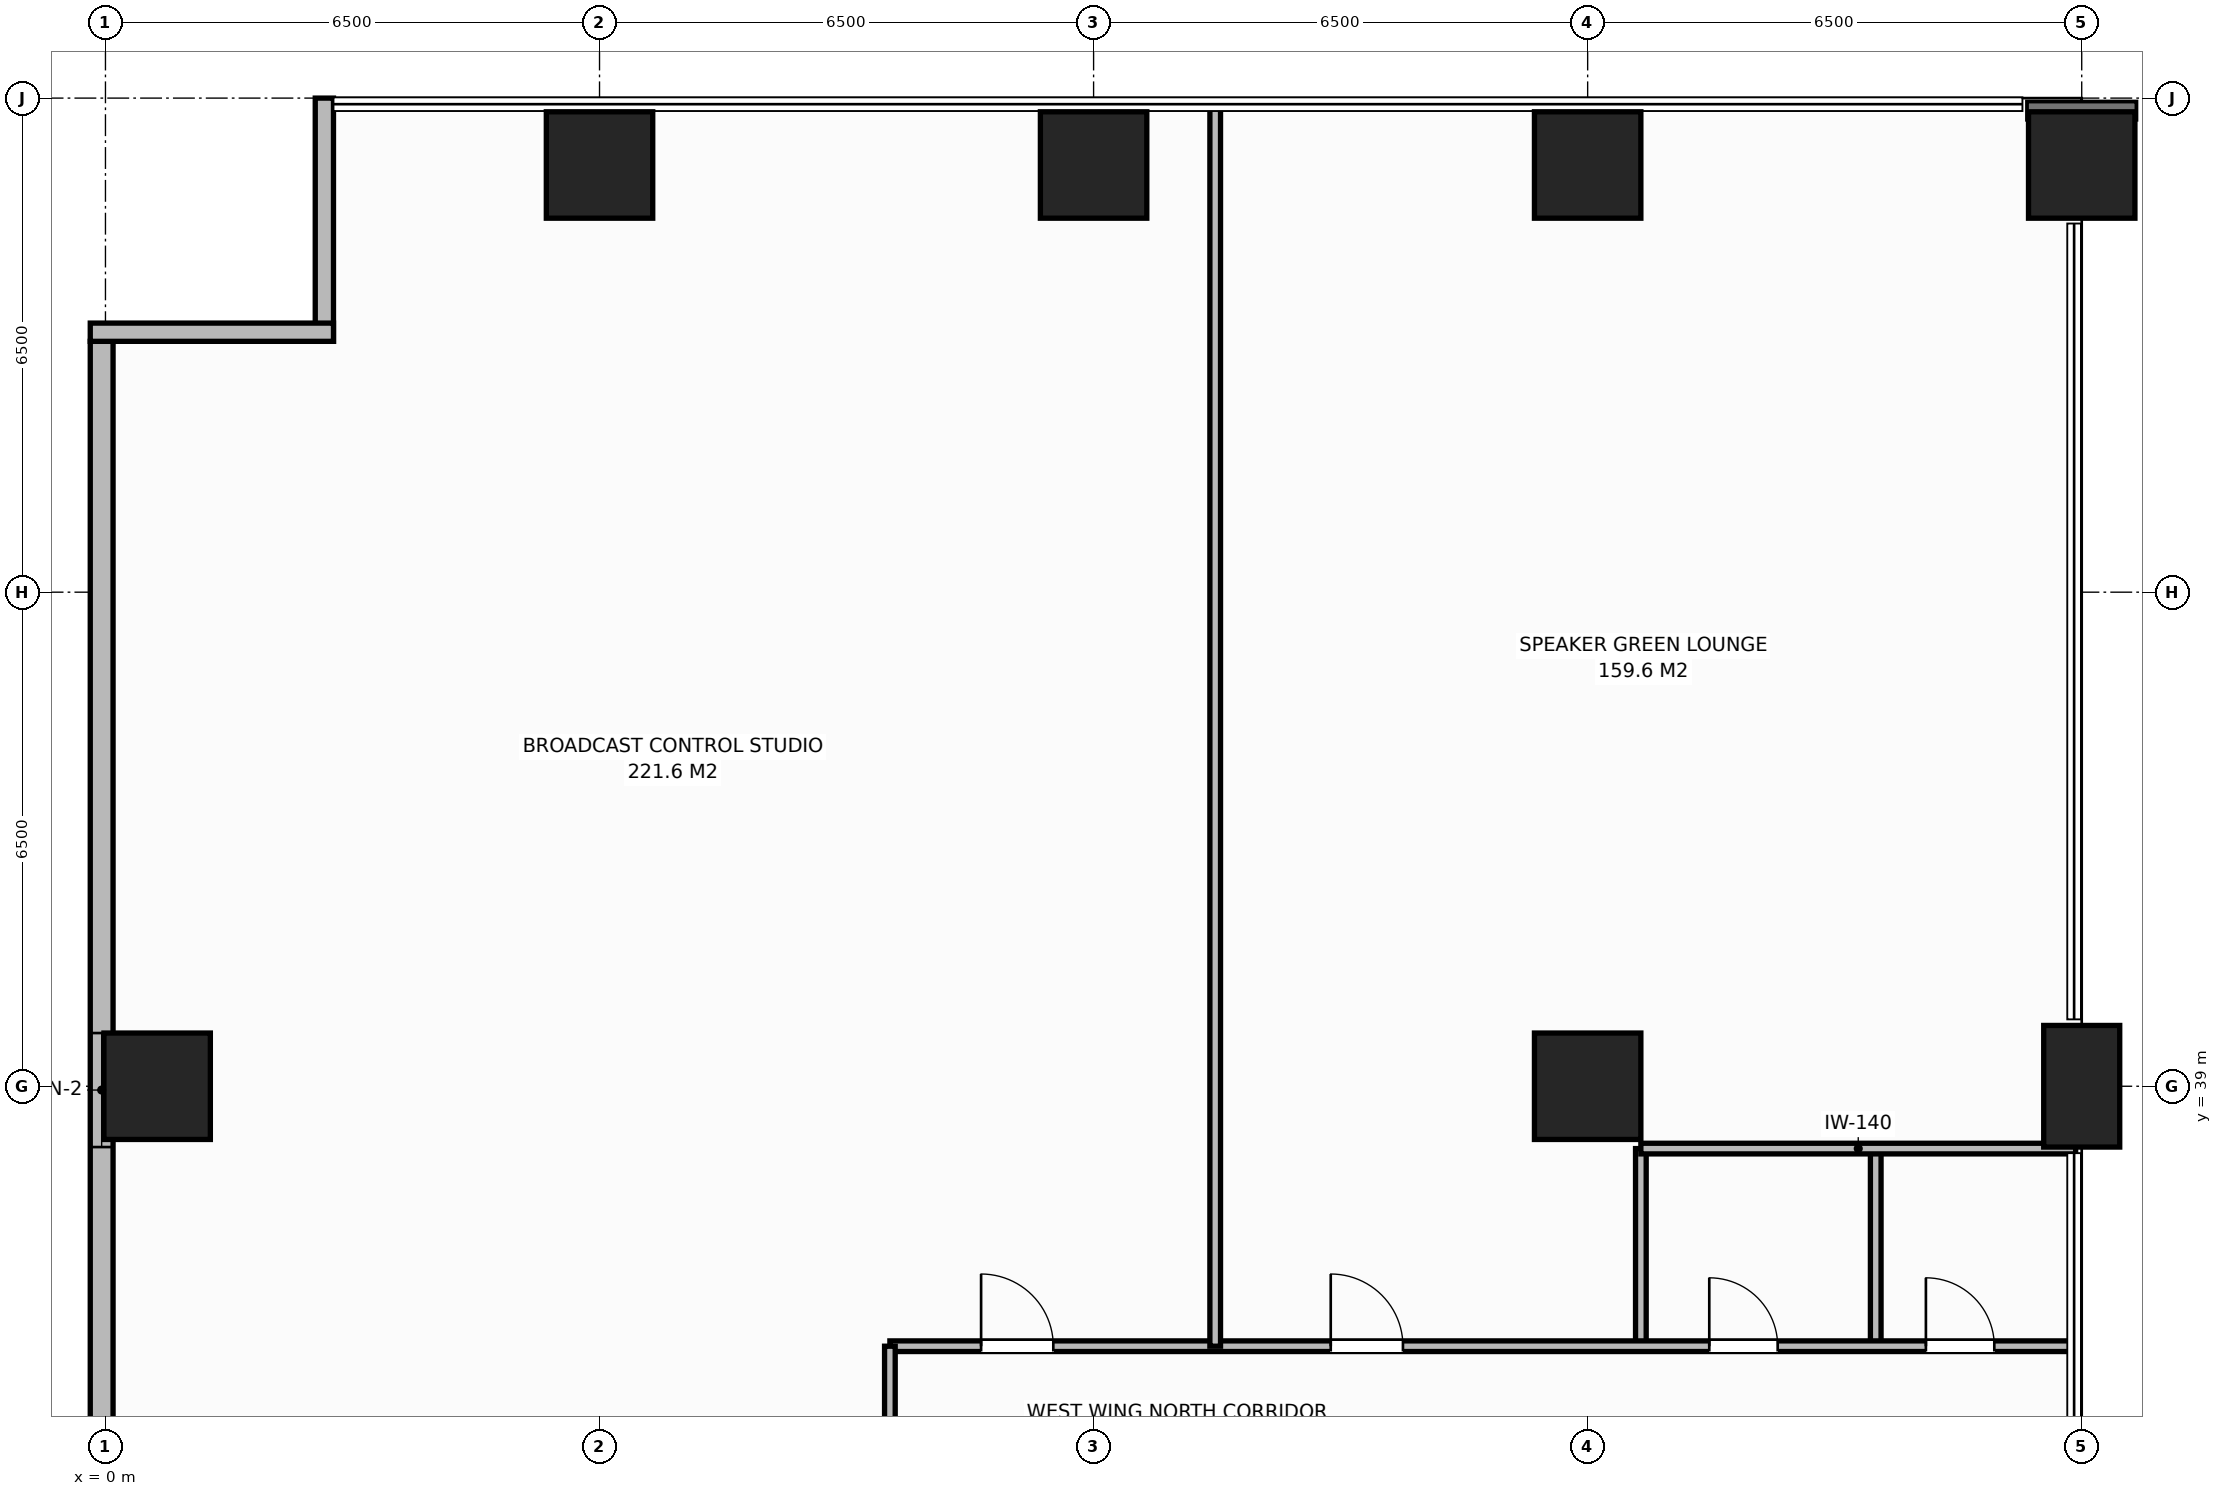
"""IFC4 building model, lengths in metres.
Left out: names, types, materials, properties, quantities, classifications, styles, units other than length and angle.
Written with IfcOpenShell. Run it as: python <this file> out.ifc"""

import sys

from ifc_helpers import new_model, si_unit, direction, frame, frame_2d, origin, origin_2d, place, context, subcontext, project, spatial, rectangle, extrude, element, fill, save


model = new_model("IFC4")
c1 = context("Model", 3, precision=1e-05, world=origin(), true_north=direction((0.0, 1.0)))
c2 = subcontext(c1, "Body", "Model", "MODEL_VIEW")
j1 = project(units=[si_unit("LENGTHUNIT", "METRE"), si_unit("PLANEANGLEUNIT", "RADIAN")], contexts=[c1])
p1 = place(None, origin())
s1 = spatial("IfcSite", under=j1, at=p1, CompositionType="ELEMENT")
p2 = place(p1, origin())
s2 = spatial("IfcBuilding", under=s1, at=p2, CompositionType="ELEMENT")
p3 = place(p2, frame((0.0, 0.0, 11.5)))
s3 = spatial("IfcBuildingStorey", under=s2, at=p3, CompositionType="ELEMENT", Elevation=11.5)
p4 = place(p3, frame((19.5, 39.0, 0.0), z_axis=(0.0, 0.0, 1.0), x_axis=(1.0, 0.0, 0.0)))
e1 = element("IfcColumn", 1, at=p4, inside=s3, PredefinedType="COLUMN", context=c2, shape_type="SweptSolid", body=[
    extrude(rectangle(XDim=1.4, YDim=1.4, at=origin_2d()), origin(), (0.0, 0.0, 1.0), 5.5),
])
p5 = place(p3, frame((26.0, 39.0, 0.0), z_axis=(0.0, 0.0, 1.0), x_axis=(1.0, 0.0, 0.0)))
e2 = element("IfcColumn", 2, at=p5, inside=s3, PredefinedType="PILASTER", context=c2, shape_type="SweptSolid", body=[
    extrude(rectangle(XDim=1.0, YDim=1.6, at=origin_2d()), origin(), (0.0, 0.0, 1.0), 5.5),
])
for number, where, z_axis, x_axis in (
    (3, (6.5, 51.12, 0.0), (0.0, 0.0, 1.0), (1.0, 0.0, 0.0)),
    (4, (13.0, 51.12, 0.0), (0.0, 0.0, 1.0), (1.0, 0.0, 0.0)),
    (5, (19.5, 51.12, 0.0), (0.0, 0.0, 1.0), (1.0, 0.0, 0.0)),
    (6, (26.0, 51.12, 0.0), (0.0, 0.0, 1.0), (1.0, 0.0, 0.0)),
    (7, (0.68, 39.0, 0.0), (0.0, 0.0, 1.0), (1.0, 0.0, 0.0)),
):
    element("IfcColumn", number, at=place(p3, frame(where, z_axis=z_axis, x_axis=x_axis)), inside=s3, PredefinedType="COLUMN", context=c2, shape_type="SweptSolid", body=[
        extrude(rectangle(XDim=1.4, YDim=1.4, at=origin_2d()), origin(), (0.0, 0.0, 1.0), 5.5),
    ])
p6 = place(p3, frame((-0.05, 3.2, 0.0), z_axis=(0.0, 0.0, 1.0), x_axis=(0.0, 1.0, 0.0)))
e8 = element("IfcWall", 8, at=p6, inside=s3, PredefinedType="STANDARD", context=c2, shape_type="SweptSolid", body=[
    extrude(rectangle(XDim=45.6, YDim=0.3, at=frame_2d((22.8, 0.0))), origin(), (0.0, 0.0, 1.0), 5.22),
])
p7 = place(p6, frame((5.0, 0.0, 0.9)))
e9 = element("IfcOpeningElement", 9, at=p7, cuts=e8, PredefinedType="OPENING", context=c2, shape_type="SweptSolid", body=[
    extrude(rectangle(XDim=1.5, YDim=2.2, at=frame_2d((0.75, 1.1))), frame((0.0, 0.16, 0.0), z_axis=(0.0, -1.0, 0.0), x_axis=(1.0, 0.0, 0.0)), (0.0, 0.0, 1.0), 0.32),
])
p8 = place(p6, frame((14.5, 0.0, 0.9)))
e10 = element("IfcOpeningElement", 10, at=p8, cuts=e8, PredefinedType="OPENING", context=c2, shape_type="SweptSolid", body=[
    extrude(rectangle(XDim=1.5, YDim=2.2, at=frame_2d((0.75, 1.1))), frame((0.0, 0.16, 0.0), z_axis=(0.0, -1.0, 0.0), x_axis=(1.0, 0.0, 0.0)), (0.0, 0.0, 1.0), 0.32),
])
p9 = place(p6, frame((25.5, 0.0, 0.9)))
e11 = element("IfcOpeningElement", 11, at=p9, cuts=e8, PredefinedType="OPENING", context=c2, shape_type="SweptSolid", body=[
    extrude(rectangle(XDim=1.5, YDim=2.2, at=frame_2d((0.75, 1.1))), frame((0.0, 0.16, 0.0), z_axis=(0.0, -1.0, 0.0), x_axis=(1.0, 0.0, 0.0)), (0.0, 0.0, 1.0), 0.32),
])
p10 = place(p6, frame((35.0, 0.0, 0.9)))
e12 = element("IfcOpeningElement", 12, at=p10, cuts=e8, PredefinedType="OPENING", context=c2, shape_type="SweptSolid", body=[
    extrude(rectangle(XDim=1.5, YDim=2.2, at=frame_2d((0.75, 1.1))), frame((0.0, 0.16, 0.0), z_axis=(0.0, -1.0, 0.0), x_axis=(1.0, 0.0, 0.0)), (0.0, 0.0, 1.0), 0.32),
])
for number, where, z_axis, x_axis in (
    (13, (2.88, 48.8, 0.0), (0.0, 0.0, 1.0), (0.0, 1.0, 0.0)),
    (14, (-0.2, 48.92, 0.0), (0.0, 0.0, 1.0), (1.0, 0.0, 0.0)),
):
    element("IfcWall", number, at=place(p3, frame(where, z_axis=z_axis, x_axis=x_axis)), inside=s3, PredefinedType="STANDARD", context=c2, shape_type="SweptSolid", body=[
        extrude(rectangle(XDim=3.2, YDim=0.24, at=frame_2d((1.6, 0.0))), origin(), (0.0, 0.0, 1.0), 5.22),
    ])
for number, where, z_axis, x_axis in (
    (15, (20.2, 35.58, 0.0), (0.0, 0.0, 1.0), (0.0, 1.0, 0.0)),
    (16, (23.29, 35.58, 0.0), (0.0, 0.0, 1.0), (0.0, 1.0, 0.0)),
):
    element("IfcWall", number, at=place(p3, frame(where, z_axis=z_axis, x_axis=x_axis)), inside=s3, PredefinedType="PARTITIONING", context=c2, shape_type="SweptSolid", body=[
        extrude(rectangle(XDim=2.6, YDim=0.14, at=frame_2d((1.3, 0.0))), origin(), (0.0, 0.0, 1.0), 5.22),
    ])
p11 = place(p3, frame((20.2, 38.18, 0.0), z_axis=(0.0, 0.0, 1.0), x_axis=(1.0, 0.0, 0.0)))
e17 = element("IfcWall", 17, at=p11, inside=s3, PredefinedType="PARTITIONING", context=c2, shape_type="SweptSolid", body=[
    extrude(rectangle(XDim=5.72, YDim=0.14, at=frame_2d((2.86, 0.0))), origin(), (0.0, 0.0, 1.0), 5.22),
])
p12 = place(p3, frame((10.32, 35.58, 0.0), z_axis=(0.0, 0.0, 1.0), x_axis=(1.0, 0.0, 0.0)))
e18 = element("IfcWall", 18, at=p12, inside=s3, PredefinedType="PARTITIONING", context=c2, shape_type="SweptSolid", body=[
    extrude(rectangle(XDim=15.6, YDim=0.14, at=frame_2d((7.8, 0.0))), origin(), (0.0, 0.0, 1.0), 5.22),
])
p13 = place(p12, frame((10.78, 0.0, 0.0)))
e19 = element("IfcOpeningElement", 19, at=p13, cuts=e18, PredefinedType="OPENING", context=c2, shape_type="SweptSolid", body=[
    extrude(rectangle(XDim=0.9, YDim=2.15, at=frame_2d((0.45, 1.075))), frame((0.0, 0.08, 0.0), z_axis=(0.0, -1.0, 0.0), x_axis=(1.0, 0.0, 0.0)), (0.0, 0.0, 1.0), 0.16),
])
p14 = place(p12, frame((13.63, 0.0, 0.0)))
e20 = element("IfcOpeningElement", 20, at=p14, cuts=e18, PredefinedType="OPENING", context=c2, shape_type="SweptSolid", body=[
    extrude(rectangle(XDim=0.9, YDim=2.15, at=frame_2d((0.45, 1.075))), frame((0.0, 0.08, 0.0), z_axis=(0.0, -1.0, 0.0), x_axis=(1.0, 0.0, 0.0)), (0.0, 0.0, 1.0), 0.16),
])
p15 = place(p12, frame((1.2, 0.0, 0.0)))
e21 = element("IfcOpeningElement", 21, at=p15, cuts=e18, PredefinedType="OPENING", context=c2, shape_type="SweptSolid", body=[
    extrude(rectangle(XDim=0.95, YDim=2.15, at=frame_2d((0.475, 1.075))), frame((0.0, 0.08, 0.0), z_axis=(0.0, -1.0, 0.0), x_axis=(1.0, 0.0, 0.0)), (0.0, 0.0, 1.0), 0.16),
])
p16 = place(p12, frame((5.8, 0.0, 0.0)))
e22 = element("IfcOpeningElement", 22, at=p16, cuts=e18, PredefinedType="OPENING", context=c2, shape_type="SweptSolid", body=[
    extrude(rectangle(XDim=0.95, YDim=2.15, at=frame_2d((0.475, 1.075))), frame((0.0, 0.08, 0.0), z_axis=(0.0, -1.0, 0.0), x_axis=(1.0, 0.0, 0.0)), (0.0, 0.0, 1.0), 0.16),
])
p17 = place(p3, frame((14.6, 35.58, 0.0), z_axis=(0.0, 0.0, 1.0), x_axis=(0.0, 1.0, 0.0)))
e23 = element("IfcWall", 23, at=p17, inside=s3, PredefinedType="PARTITIONING", context=c2, shape_type="SweptSolid", body=[
    extrude(rectangle(XDim=16.36, YDim=0.14, at=frame_2d((8.18, 0.0))), origin(), (0.0, 0.0, 1.0), 5.22),
])
p18 = place(p3, frame((10.32, 18.6, 0.0), z_axis=(0.0, 0.0, 1.0), x_axis=(0.0, 1.0, 0.0)))
e24 = element("IfcWall", 24, at=p18, inside=s3, PredefinedType="PARTITIONING", context=c2, shape_type="SweptSolid", body=[
    extrude(rectangle(XDim=16.98, YDim=0.14, at=frame_2d((8.49, 0.0))), origin(), (0.0, 0.0, 1.0), 5.22),
])
p19 = place(p18, frame((4.0, 0.0, 0.0)))
e25 = element("IfcOpeningElement", 25, at=p19, cuts=e24, PredefinedType="OPENING", context=c2, shape_type="SweptSolid", body=[
    extrude(rectangle(XDim=1.5, YDim=2.2, at=frame_2d((0.75, 1.1))), frame((0.0, 0.08, 0.0), z_axis=(0.0, -1.0, 0.0), x_axis=(1.0, 0.0, 0.0)), (0.0, 0.0, 1.0), 0.16),
])
p20 = place(p10, origin())
e26 = element("IfcWindow", 26, at=p20, inside=s3, PartitioningType="SINGLE_PANEL", PredefinedType="WINDOW", context=c2, shape_type="SweptSolid", body=[
    extrude(rectangle(XDim=1.5, YDim=2.2, at=frame_2d((0.75, 1.1))), frame((0.0, 0.03, 0.0), z_axis=(0.0, -1.0, 0.0), x_axis=(1.0, 0.0, 0.0)), (0.0, 0.0, 1.0), 0.06),
])
fill(e12, e26)
p21 = place(p13, origin())
e27 = element("IfcDoor", 27, at=p21, inside=s3, OperationType="SINGLE_SWING_LEFT", PredefinedType="DOOR", context=c2, shape_type="SweptSolid", body=[
    extrude(rectangle(XDim=0.9, YDim=2.15, at=frame_2d((0.45, 1.075))), frame((0.0, 0.025, 0.0), z_axis=(0.0, -1.0, 0.0), x_axis=(1.0, 0.0, 0.0)), (0.0, 0.0, 1.0), 0.05),
])
fill(e19, e27)
p22 = place(p14, origin())
e28 = element("IfcDoor", 28, at=p22, inside=s3, OperationType="SINGLE_SWING_LEFT", PredefinedType="DOOR", context=c2, shape_type="SweptSolid", body=[
    extrude(rectangle(XDim=0.9, YDim=2.15, at=frame_2d((0.45, 1.075))), frame((0.0, 0.025, 0.0), z_axis=(0.0, -1.0, 0.0), x_axis=(1.0, 0.0, 0.0)), (0.0, 0.0, 1.0), 0.05),
])
fill(e20, e28)
p23 = place(p15, origin())
e29 = element("IfcDoor", 29, at=p23, inside=s3, OperationType="SINGLE_SWING_LEFT", PredefinedType="DOOR", context=c2, shape_type="SweptSolid", body=[
    extrude(rectangle(XDim=0.95, YDim=2.15, at=frame_2d((0.475, 1.075))), frame((0.0, 0.025, 0.0), z_axis=(0.0, -1.0, 0.0), x_axis=(1.0, 0.0, 0.0)), (0.0, 0.0, 1.0), 0.05),
])
fill(e21, e29)
p24 = place(p16, origin())
e30 = element("IfcDoor", 30, at=p24, inside=s3, OperationType="SINGLE_SWING_LEFT", PredefinedType="DOOR", context=c2, shape_type="SweptSolid", body=[
    extrude(rectangle(XDim=0.95, YDim=2.15, at=frame_2d((0.475, 1.075))), frame((0.0, 0.025, 0.0), z_axis=(0.0, -1.0, 0.0), x_axis=(1.0, 0.0, 0.0)), (0.0, 0.0, 1.0), 0.05),
])
fill(e22, e30)
save(model, sys.argv[1])
